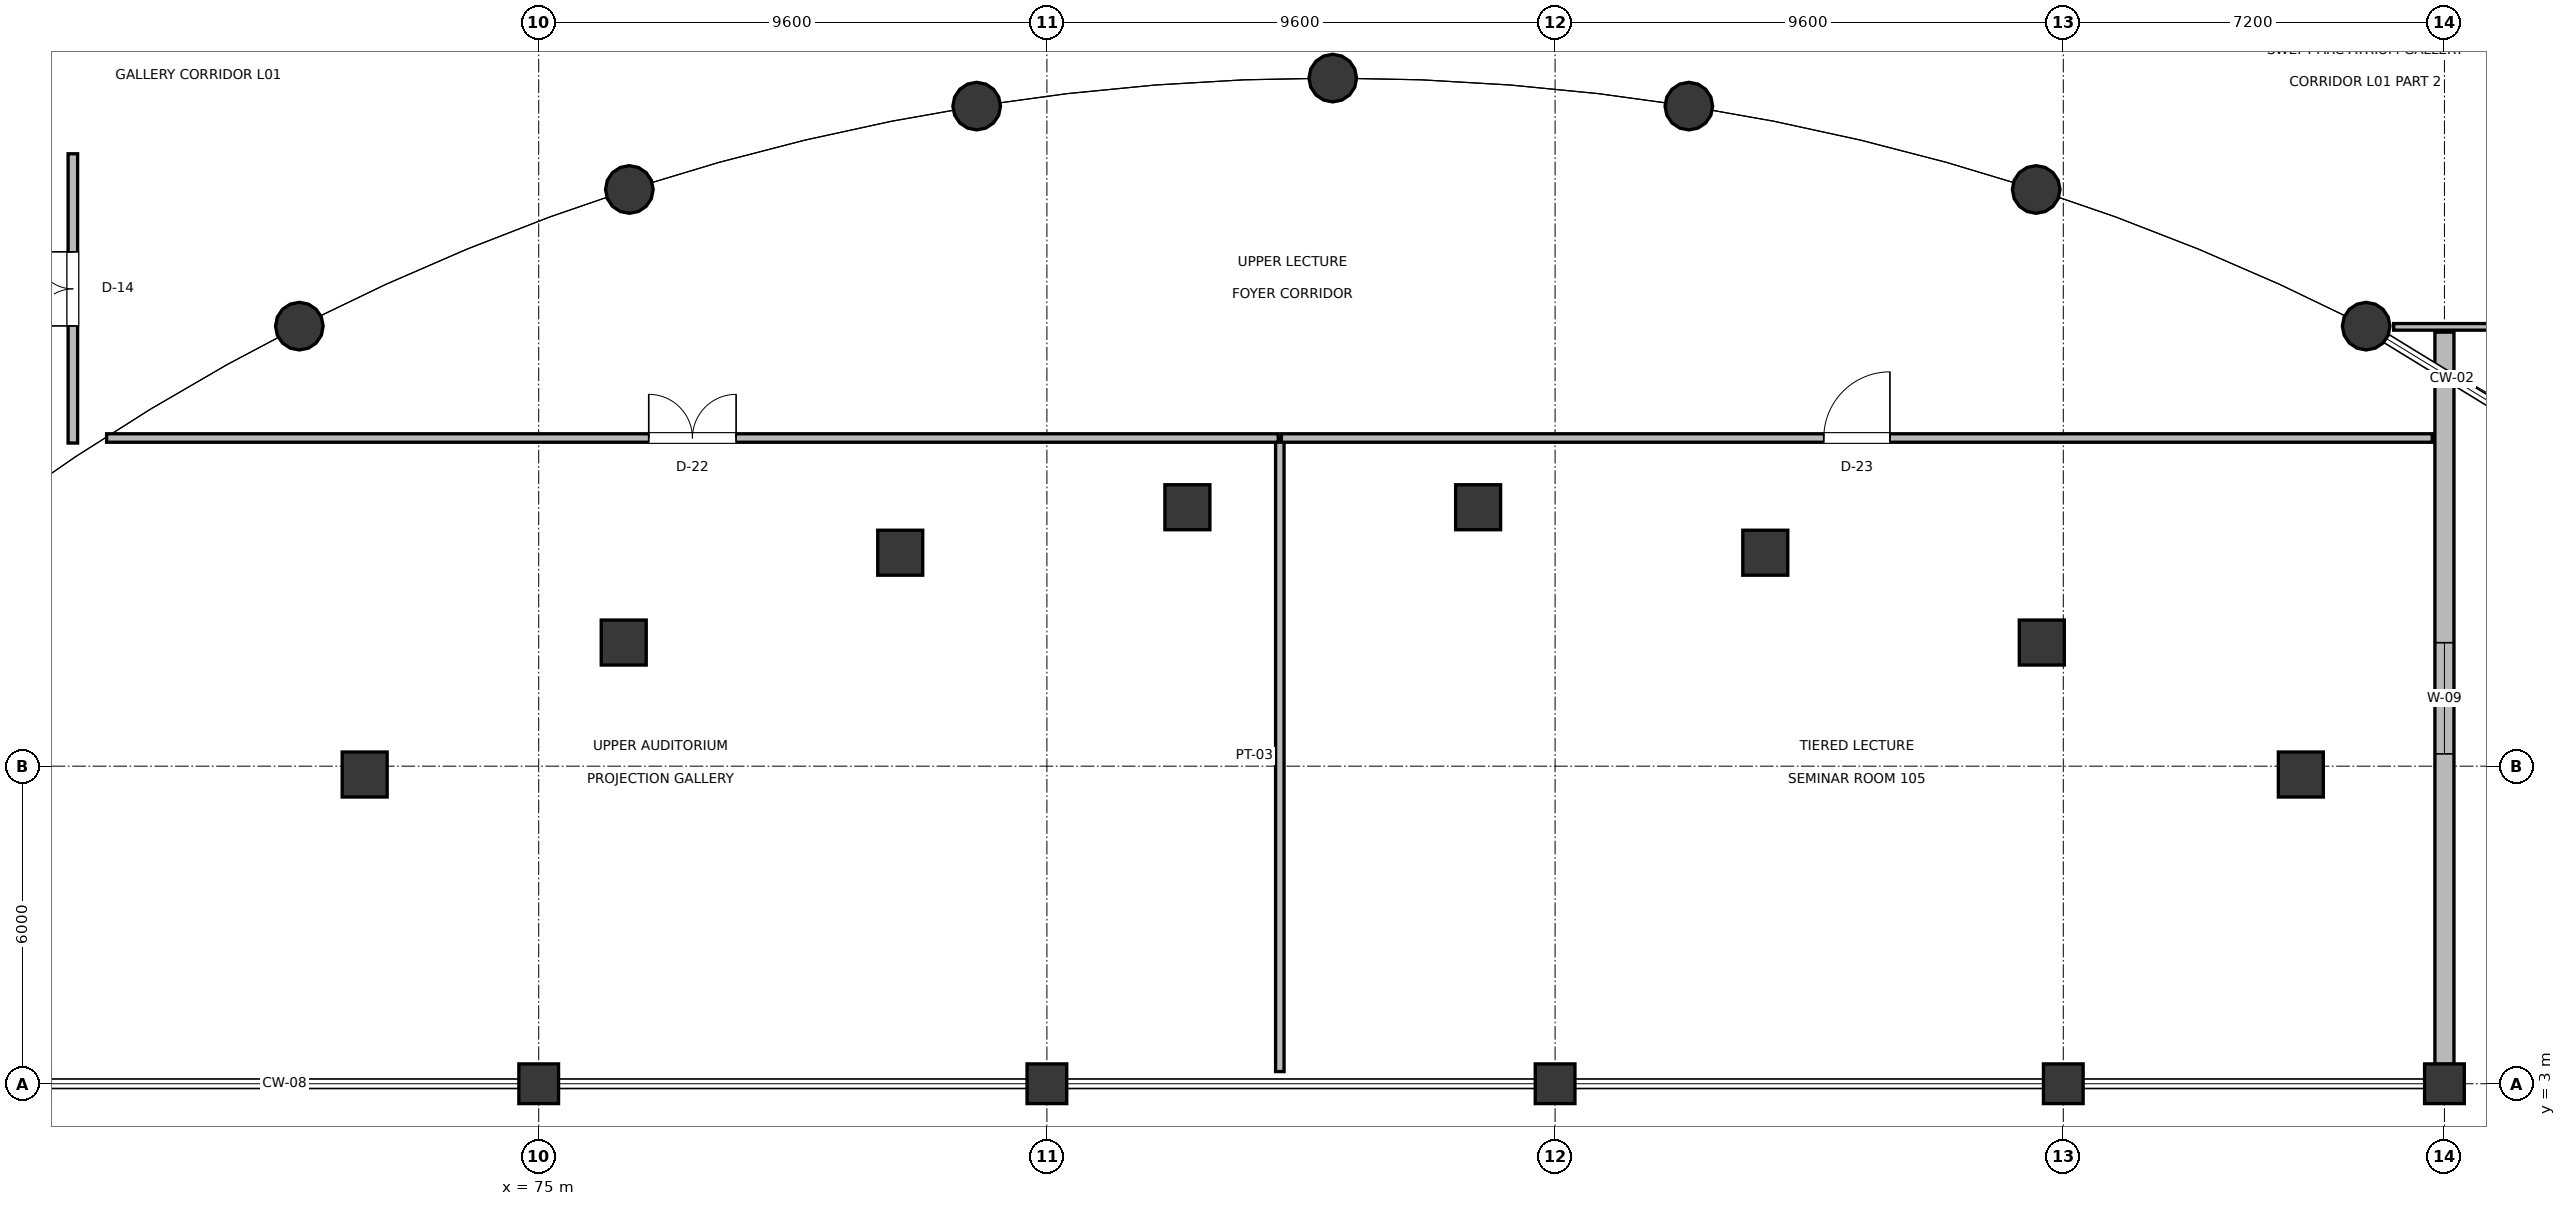
"""IFC4 building model, lengths in metres.
Left out: names, types, materials, properties, quantities, classifications, styles, units other than length and angle.
Written with IfcOpenShell. Run it as: python <this file> out.ifc"""

import sys

from ifc_helpers import new_model, si_unit, direction, frame, frame_2d, origin, origin_2d, place, context, subcontext, project, spatial, rectangle, circle, extrude, element, fill, save


model = new_model("IFC4")
c1 = context("Model", 3, precision=1e-05, world=origin(), true_north=direction((0.0, 1.0)))
c2 = subcontext(c1, "Body", "Model", "MODEL_VIEW")
j1 = project(units=[si_unit("LENGTHUNIT", "METRE"), si_unit("PLANEANGLEUNIT", "RADIAN")], contexts=[c1])
p1 = place(None, origin())
s1 = spatial("IfcSite", under=j1, at=p1, CompositionType="ELEMENT")
p2 = place(p1, origin())
s2 = spatial("IfcBuilding", under=s1, at=p2, CompositionType="ELEMENT")
p3 = place(p2, frame((0.0, 0.0, 5.4)))
s3 = spatial("IfcBuildingStorey", under=s2, at=p3, CompositionType="ELEMENT", Elevation=5.4)
for number, where, z_axis, x_axis in (
    (1, (71.713, 8.842, 0.0), (0.0, 0.0, 1.0), (1.0, 0.0, 0.0)),
    (2, (76.606, 11.336, 0.0), (0.0, 0.0, 1.0), (1.0, 0.0, 0.0)),
    (3, (81.829, 13.033, 0.0), (0.0, 0.0, 1.0), (1.0, 0.0, 0.0)),
    (4, (87.254, 13.892, 0.0), (0.0, 0.0, 1.0), (1.0, 0.0, 0.0)),
    (5, (92.746, 13.892, 0.0), (0.0, 0.0, 1.0), (1.0, 0.0, 0.0)),
    (6, (98.171, 13.033, 0.0), (0.0, 0.0, 1.0), (1.0, 0.0, 0.0)),
    (7, (103.394, 11.336, 0.0), (0.0, 0.0, 1.0), (1.0, 0.0, 0.0)),
    (8, (108.287, 8.842, 0.0), (0.0, 0.0, 1.0), (1.0, 0.0, 0.0)),
):
    element("IfcColumn", number, at=place(p3, frame(where, z_axis=z_axis, x_axis=x_axis)), inside=s3, PredefinedType="COLUMN", context=c2, shape_type="SweptSolid", body=[
        extrude(rectangle(XDim=0.85, YDim=0.85, at=origin_2d()), origin(), (0.0, 0.0, 1.0), 4.8),
    ])
for number, where, z_axis, x_axis in (
    (9, (75.0, 3.0, 0.0), (0.0, 0.0, 1.0), (1.0, 0.0, 0.0)),
    (10, (84.6, 3.0, 0.0), (0.0, 0.0, 1.0), (1.0, 0.0, 0.0)),
    (11, (94.2, 3.0, 0.0), (0.0, 0.0, 1.0), (1.0, 0.0, 0.0)),
    (12, (103.8, 3.0, 0.0), (0.0, 0.0, 1.0), (1.0, 0.0, 0.0)),
    (13, (111.0, 3.0, 0.0), (0.0, 0.0, 1.0), (1.0, 0.0, 0.0)),
):
    element("IfcColumn", number, at=place(p3, frame(where, z_axis=z_axis, x_axis=x_axis)), inside=s3, PredefinedType="COLUMN", context=c2, shape_type="SweptSolid", body=[
        extrude(rectangle(XDim=0.75, YDim=0.75, at=origin_2d()), origin(), (0.0, 0.0, 1.0), 4.8),
    ])
for number, where, z_axis, x_axis in (
    (14, (70.479, 17.313, 0.0), (0.0, 0.0, 1.0), (1.0, 0.0, 0.0)),
    (15, (76.712, 19.896, 0.0), (0.0, 0.0, 1.0), (1.0, 0.0, 0.0)),
    (16, (83.273, 21.471, 0.0), (0.0, 0.0, 1.0), (1.0, 0.0, 0.0)),
    (17, (90.0, 22.0, 0.0), (0.0, 0.0, 1.0), (1.0, 0.0, 0.0)),
    (18, (96.727, 21.471, 0.0), (0.0, 0.0, 1.0), (1.0, 0.0, 0.0)),
    (19, (103.288, 19.896, 0.0), (0.0, 0.0, 1.0), (1.0, 0.0, 0.0)),
    (20, (109.521, 17.313, 0.0), (0.0, 0.0, 1.0), (1.0, 0.0, 0.0)),
):
    element("IfcColumn", number, at=place(p3, frame(where, z_axis=z_axis, x_axis=x_axis)), inside=s3, PredefinedType="COLUMN", context=c2, shape_type="SweptSolid", body=[
        extrude(circle(Radius=0.45, at=origin_2d()), origin(), (0.0, 0.0, 1.0), 4.8),
    ])
p4 = place(p3, frame((111.0, 3.365, 0.0), z_axis=(0.0, 0.0, 1.0), x_axis=(0.0, 1.0, 0.0)))
e21 = element("IfcWall", 21, at=p4, inside=s3, PredefinedType="SOLIDWALL", context=c2, shape_type="SweptSolid", body=[
    extrude(rectangle(XDim=13.835, YDim=0.36, at=frame_2d((6.917, 0.0))), origin(), (0.0, 0.0, 1.0), 3.705),
])
p5 = place(p4, frame((5.867, 0.0, 1.0)))
e22 = element("IfcOpeningElement", 22, at=p5, cuts=e21, PredefinedType="OPENING", context=c2, shape_type="SweptSolid", body=[
    extrude(rectangle(XDim=2.1, YDim=1.9, at=frame_2d((1.05, 0.95))), frame((0.0, 0.19, 0.0), z_axis=(0.0, -1.0, 0.0), x_axis=(1.0, 0.0, 0.0)), (0.0, 0.0, 1.0), 0.38),
])
p6 = place(p3, frame((89.0, 3.23, 0.0), z_axis=(0.0, 0.0, 1.0), x_axis=(0.0, 1.0, 0.0)))
e23 = element("IfcWall", 23, at=p6, inside=s3, PredefinedType="PARTITIONING", context=c2, shape_type="SweptSolid", body=[
    extrude(rectangle(XDim=11.94, YDim=0.16, at=frame_2d((5.97, 0.0))), origin(), (0.0, 0.0, 1.0), 3.605),
])
p7 = place(p3, frame((66.838, 15.2, 0.0), z_axis=(0.0, 0.0, 1.0), x_axis=(1.0, 0.0, 0.0)))
e24 = element("IfcWall", 24, at=p7, inside=s3, PredefinedType="PARTITIONING", context=c2, shape_type="SweptSolid", body=[
    extrude(rectangle(XDim=22.132, YDim=0.16, at=frame_2d((11.066, 0.0))), origin(), (0.0, 0.0, 1.0), 3.675),
])
p8 = place(p7, frame((10.241, 0.0, 0.0)))
e25 = element("IfcOpeningElement", 25, at=p8, cuts=e24, PredefinedType="OPENING", context=c2, shape_type="SweptSolid", body=[
    extrude(rectangle(XDim=1.65, YDim=2.3, at=frame_2d((0.825, 1.15))), frame((0.0, 0.09, 0.0), z_axis=(0.0, -1.0, 0.0), x_axis=(1.0, 0.0, 0.0)), (0.0, 0.0, 1.0), 0.18),
])
p9 = place(p3, frame((89.03, 15.2, 0.0), z_axis=(0.0, 0.0, 1.0), x_axis=(1.0, 0.0, 0.0)))
e26 = element("IfcWall", 26, at=p9, inside=s3, PredefinedType="PARTITIONING", context=c2, shape_type="SweptSolid", body=[
    extrude(rectangle(XDim=21.74, YDim=0.16, at=frame_2d((10.87, 0.0))), origin(), (0.0, 0.0, 1.0), 3.705),
])
p10 = place(p9, frame((10.245, 0.0, 0.0)))
e27 = element("IfcOpeningElement", 27, at=p10, cuts=e26, PredefinedType="OPENING", context=c2, shape_type="SweptSolid", body=[
    extrude(rectangle(XDim=1.25, YDim=2.2, at=frame_2d((0.625, 1.1))), frame((0.0, 0.09, 0.0), z_axis=(0.0, -1.0, 0.0), x_axis=(1.0, 0.0, 0.0)), (0.0, 0.0, 1.0), 0.18),
])
p11 = place(p3, frame((110.041, 17.3, 0.0), z_axis=(0.0, 0.0, 1.0), x_axis=(1.0, 0.0, 0.0)))
e28 = element("IfcWall", 28, at=p11, inside=s3, PredefinedType="PARTITIONING", context=c2, shape_type="SweptSolid", body=[
    extrude(rectangle(XDim=3.779, YDim=0.125, at=frame_2d((1.89, 0.0))), origin(), (0.0, 0.0, 1.0), 3.705),
])
p12 = place(p3, frame((66.2, 15.105, 0.0), z_axis=(0.0, 0.0, 1.0), x_axis=(0.0, 1.0, 0.0)))
e29 = element("IfcWall", 29, at=p12, inside=s3, PredefinedType="PARTITIONING", context=c2, shape_type="SweptSolid", body=[
    extrude(rectangle(XDim=5.465, YDim=0.18, at=frame_2d((2.733, 0.0))), origin(), (0.0, 0.0, 1.0), 3.675),
])
p13 = place(p12, frame((2.213, 0.0, 0.0)))
e30 = element("IfcOpeningElement", 30, at=p13, cuts=e29, PredefinedType="OPENING", context=c2, shape_type="SweptSolid", body=[
    extrude(rectangle(XDim=1.4, YDim=2.2, at=frame_2d((0.7, 1.1))), frame((0.0, 0.1, 0.0), z_axis=(0.0, -1.0, 0.0), x_axis=(1.0, 0.0, 0.0)), (0.0, 0.0, 1.0), 0.2),
])
p14 = place(p5, frame((2.1, 0.0, 0.0), z_axis=(0.0, 0.0, 1.0), x_axis=(-1.0, 0.0, 0.0)))
e31 = element("IfcWindow", 31, at=p14, inside=s3, PartitioningType="DOUBLE_PANEL_VERTICAL", PredefinedType="WINDOW", context=c2, shape_type="SweptSolid", body=[
    extrude(rectangle(XDim=2.1, YDim=1.9, at=frame_2d((1.05, 0.95))), frame((0.0, 0.03, 0.0), z_axis=(0.0, -1.0, 0.0), x_axis=(1.0, 0.0, 0.0)), (0.0, 0.0, 1.0), 0.06),
])
fill(e22, e31)
p15 = place(p8, origin())
e32 = element("IfcDoor", 32, at=p15, inside=s3, OperationType="DOUBLE_DOOR_SINGLE_SWING", PredefinedType="DOOR", context=c2, shape_type="SweptSolid", body=[
    extrude(rectangle(XDim=1.65, YDim=2.3, at=frame_2d((0.825, 1.15))), frame((0.0, 0.025, 0.0), z_axis=(0.0, -1.0, 0.0), x_axis=(1.0, 0.0, 0.0)), (0.0, 0.0, 1.0), 0.05),
])
fill(e25, e32)
p16 = place(p10, origin())
e33 = element("IfcDoor", 33, at=p16, inside=s3, OperationType="SINGLE_SWING_RIGHT", PredefinedType="DOOR", context=c2, shape_type="SweptSolid", body=[
    extrude(rectangle(XDim=1.25, YDim=2.2, at=frame_2d((0.625, 1.1))), frame((0.0, 0.025, 0.0), z_axis=(0.0, -1.0, 0.0), x_axis=(1.0, 0.0, 0.0)), (0.0, 0.0, 1.0), 0.05),
])
fill(e27, e33)
p17 = place(p13, origin())
e34 = element("IfcDoor", 34, at=p17, inside=s3, OperationType="DOUBLE_DOOR_SINGLE_SWING", PredefinedType="DOOR", context=c2, shape_type="SweptSolid", body=[
    extrude(rectangle(XDim=1.4, YDim=2.2, at=frame_2d((0.7, 1.1))), frame((0.0, 0.025, 0.0), z_axis=(0.0, -1.0, 0.0), x_axis=(1.0, 0.0, 0.0)), (0.0, 0.0, 1.0), 0.05),
])
fill(e30, e34)
save(model, sys.argv[1])
